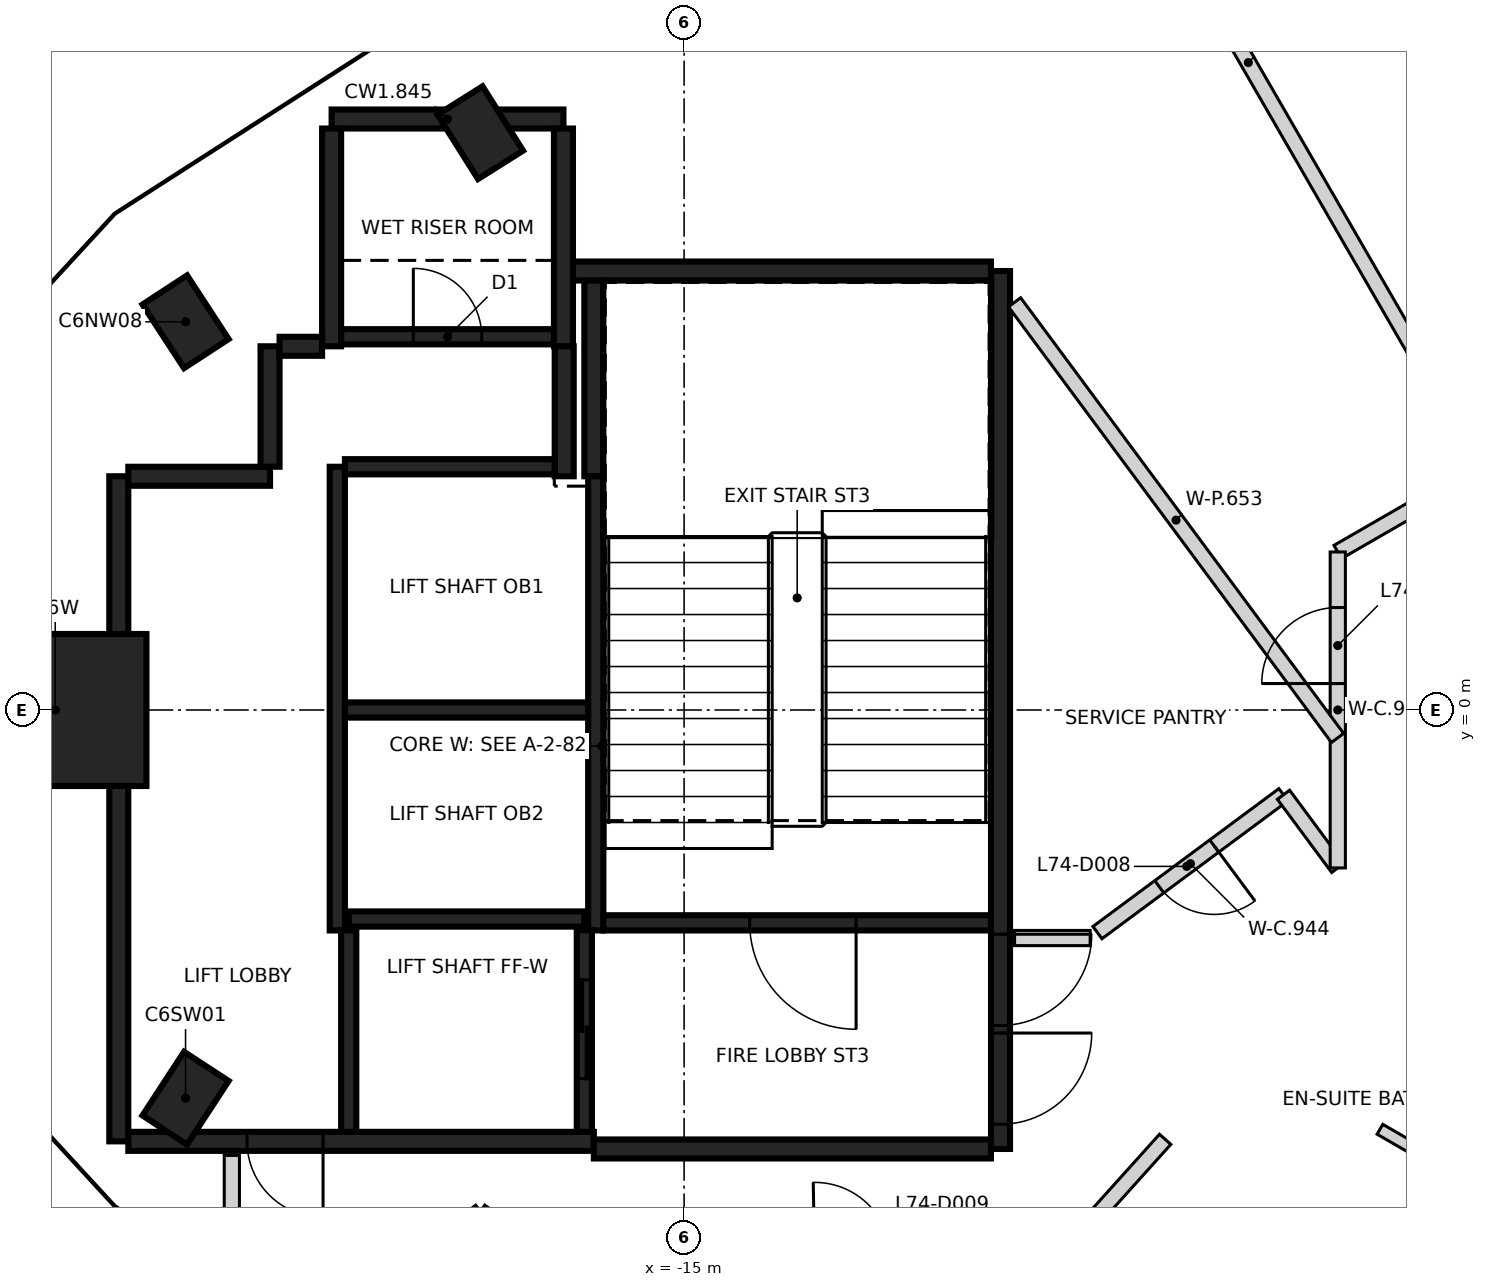
"""IFC4 building model, lengths in metres.
Left out: names, types, materials, properties, quantities, classifications, styles, units other than length and angle.
Written with IfcOpenShell. Run it as: python <this file> out.ifc"""

import sys

from ifc_helpers import new_model, si_unit, direction, frame, frame_2d, origin, origin_2d, place, context, subcontext, project, spatial, rectangle, extrude, element, fill, save


model = new_model("IFC4")
c1 = context("Model", 3, precision=1e-05, world=origin(), true_north=direction((0.0, 1.0)))
c2 = subcontext(c1, "Body", "Model", "MODEL_VIEW")
j1 = project(units=[si_unit("LENGTHUNIT", "METRE"), si_unit("PLANEANGLEUNIT", "RADIAN")], contexts=[c1])
p1 = place(None, origin())
s1 = spatial("IfcSite", under=j1, at=p1, CompositionType="ELEMENT")
p2 = place(p1, origin())
s2 = spatial("IfcBuilding", under=s1, at=p2, CompositionType="ELEMENT")
p3 = place(p2, frame((0.0, 0.0, 294.6)))
s3 = spatial("IfcBuildingStorey", under=s2, at=p3, CompositionType="ELEMENT", Elevation=294.6)
for number, where, z_axis, x_axis in (
    (1, (-17.681, 7.595, -0.35), (0.0, 0.0, 1.0), (-0.533, 0.846, 0.0)),
    (2, (-21.559, 5.107, -0.35), (0.0, 0.0, 1.0), (-0.547, 0.837, 0.0)),
    (3, (-21.559, -5.107, -0.35), (0.0, 0.0, 1.0), (0.547, 0.837, 0.0)),
):
    element("IfcColumn", number, at=place(p3, frame(where, z_axis=z_axis, x_axis=x_axis)), inside=s3, PredefinedType="COLUMN", context=c2, shape_type="SweptSolid", body=[
        extrude(rectangle(XDim=1.0, YDim=0.7, at=origin_2d()), origin(), (0.0, 0.0, 1.0), 3.6),
    ])
p4 = place(p3, frame((-23.273, 0.0, -0.35), z_axis=(0.0, 0.0, 1.0), x_axis=(1.0, 0.0, 0.0)))
e4 = element("IfcColumn", 4, at=p4, inside=s3, PredefinedType="COLUMN", context=c2, shape_type="SweptSolid", body=[
    extrude(rectangle(XDim=2.4, YDim=2.0, at=origin_2d()), origin(), (0.0, 0.0, 1.0), 3.6),
])
p5 = place(p3, frame((-10.837, 5.775, 0.0), z_axis=(0.0, 0.0, 1.0), x_axis=(0.0, -1.0, 0.0)))
e5 = element("IfcWall", 5, at=p5, inside=s3, PredefinedType="SHEAR", context=c2, shape_type="SweptSolid", body=[
    extrude(rectangle(XDim=11.55, YDim=0.25, at=frame_2d((5.775, 0.0))), origin(), (0.0, 0.0, 1.0), 3.25),
])
p6 = place(p5, frame((10.025, 0.0, 0.0)))
e6 = element("IfcOpeningElement", 6, at=p6, cuts=e5, PredefinedType="OPENING", context=c2, shape_type="SweptSolid", body=[
    extrude(rectangle(XDim=1.2, YDim=2.1, at=frame_2d((0.6, 1.05))), frame((0.0, 0.135, 0.0), z_axis=(0.0, -1.0, 0.0), x_axis=(1.0, 0.0, 0.0)), (0.0, 0.0, 1.0), 0.27),
])
p7 = place(p5, frame((8.725, 0.0, 0.0)))
e7 = element("IfcOpeningElement", 7, at=p7, cuts=e5, PredefinedType="OPENING", context=c2, shape_type="SweptSolid", body=[
    extrude(rectangle(XDim=1.2, YDim=2.1, at=frame_2d((0.6, 1.05))), frame((0.0, 0.135, 0.0), z_axis=(0.0, -1.0, 0.0), x_axis=(1.0, 0.0, 0.0)), (0.0, 0.0, 1.0), 0.27),
])
p8 = place(p3, frame((-22.437, -5.675, 0.0), z_axis=(0.0, 0.0, 1.0), x_axis=(0.0, 1.0, 0.0)))
e8 = element("IfcWall", 8, at=p8, inside=s3, PredefinedType="SHEAR", context=c2, shape_type="SweptSolid", body=[
    extrude(rectangle(XDim=8.75, YDim=0.25, at=frame_2d((4.375, 0.0))), origin(), (0.0, 0.0, 1.0), 3.25),
])
p9 = place(p3, frame((-16.187, -5.675, 0.0), z_axis=(0.0, 0.0, 1.0), x_axis=(-1.0, 0.0, 0.0)))
e9 = element("IfcWall", 9, at=p9, inside=s3, PredefinedType="SHEAR", context=c2, shape_type="SweptSolid", body=[
    extrude(rectangle(XDim=6.125, YDim=0.25, at=frame_2d((3.062, 0.0))), origin(), (0.0, 0.0, 1.0), 3.25),
])
p10 = place(p9, frame((3.563, 0.0, 0.0)))
e10 = element("IfcOpeningElement", 10, at=p10, cuts=e9, PredefinedType="OPENING", context=c2, shape_type="SweptSolid", body=[
    extrude(rectangle(XDim=1.0, YDim=2.1, at=frame_2d((0.5, 1.05))), frame((0.0, 0.135, 0.0), z_axis=(0.0, -1.0, 0.0), x_axis=(1.0, 0.0, 0.0)), (0.0, 0.0, 1.0), 0.27),
])
p11 = place(p3, frame((-10.963, -5.775, 0.0), z_axis=(0.0, 0.0, 1.0), x_axis=(-1.0, 0.0, 0.0)))
e11 = element("IfcWall", 11, at=p11, inside=s3, PredefinedType="SHEAR", context=c2, shape_type="SweptSolid", body=[
    extrude(rectangle(XDim=5.225, YDim=0.25, at=frame_2d((2.612, 0.0))), origin(), (0.0, 0.0, 1.0), 3.25),
])
p12 = place(p3, frame((-16.472, 5.775, 0.0), z_axis=(0.0, 0.0, 1.0), x_axis=(1.0, 0.0, 0.0)))
e12 = element("IfcWall", 12, at=p12, inside=s3, PredefinedType="SHEAR", context=c2, shape_type="SweptSolid", body=[
    extrude(rectangle(XDim=5.51, YDim=0.25, at=frame_2d((2.755, 0.0))), origin(), (0.0, 0.0, 1.0), 3.25),
])
p13 = place(p3, frame((-19.637, 7.775, 0.0), z_axis=(0.0, 0.0, 1.0), x_axis=(1.0, 0.0, 0.0)))
e13 = element("IfcWall", 13, at=p13, inside=s3, PredefinedType="SHEAR", context=c2, shape_type="SweptSolid", body=[
    extrude(rectangle(XDim=3.05, YDim=0.25, at=frame_2d((1.525, 0.0))), origin(), (0.0, 0.0, 1.0), 3.25),
])
for number, where, z_axis, x_axis in (
    (14, (-16.587, 7.65, 0.0), (0.0, 0.0, 1.0), (0.0, -1.0, 0.0)),
    (15, (-19.637, 4.785, 0.0), (0.0, 0.0, 1.0), (0.0, 1.0, 0.0)),
):
    element("IfcWall", number, at=place(p3, frame(where, z_axis=z_axis, x_axis=x_axis)), inside=s3, PredefinedType="SHEAR", context=c2, shape_type="SweptSolid", body=[
        extrude(rectangle(XDim=2.865, YDim=0.25, at=frame_2d((1.432, 0.0))), origin(), (0.0, 0.0, 1.0), 3.25),
    ])
p14 = place(p3, frame((-16.187, 3.075, 0.0), z_axis=(0.0, 0.0, 1.0), x_axis=(0.0, 1.0, 0.0)))
e16 = element("IfcWall", 16, at=p14, inside=s3, PredefinedType="SHEAR", context=c2, shape_type="SweptSolid", body=[
    extrude(rectangle(XDim=2.575, YDim=0.25, at=frame_2d((1.287, 0.0))), origin(), (0.0, 0.0, 1.0), 3.25),
])
p15 = place(p3, frame((-22.312, 3.075, 0.0), z_axis=(0.0, 0.0, 1.0), x_axis=(1.0, 0.0, 0.0)))
e17 = element("IfcWall", 17, at=p15, inside=s3, PredefinedType="SHEAR", context=c2, shape_type="SweptSolid", body=[
    extrude(rectangle(XDim=1.865, YDim=0.25, at=frame_2d((0.932, 0.0))), origin(), (0.0, 0.0, 1.0), 3.25),
])
p16 = place(p3, frame((-16.577, 4.785, 0.0), z_axis=(0.0, 0.0, 1.0), x_axis=(0.0, -1.0, 0.0)))
e18 = element("IfcWall", 18, at=p16, inside=s3, PredefinedType="SHEAR", context=c2, shape_type="SweptSolid", body=[
    extrude(rectangle(XDim=1.71, YDim=0.25, at=frame_2d((0.855, 0.0))), origin(), (0.0, 0.0, 1.0), 3.25),
])
p17 = place(p3, frame((-20.447, 3.2, 0.0), z_axis=(0.0, 0.0, 1.0), x_axis=(0.0, 1.0, 0.0)))
e19 = element("IfcWall", 19, at=p17, inside=s3, PredefinedType="SHEAR", context=c2, shape_type="SweptSolid", body=[
    extrude(rectangle(XDim=1.584, YDim=0.25, at=frame_2d((0.792, 0.0))), origin(), (0.0, 0.0, 1.0), 3.25),
])
p18 = place(p3, frame((-20.322, 4.785, 0.0), z_axis=(0.0, 0.0, 1.0), x_axis=(1.0, 0.0, 0.0)))
e20 = element("IfcWall", 20, at=p18, inside=s3, PredefinedType="SHEAR", context=c2, shape_type="SweptSolid", body=[
    extrude(rectangle(XDim=0.559, YDim=0.25, at=frame_2d((0.28, 0.0))), origin(), (0.0, 0.0, 1.0), 3.25),
])
p19 = place(p3, frame((-16.162, 3.074, 0.0), z_axis=(0.0, 0.0, 1.0), x_axis=(0.0, -1.0, 0.0)))
e21 = element("IfcWall", 21, at=p19, inside=s3, PredefinedType="SHEAR", context=c2, shape_type="SweptSolid", body=[
    extrude(rectangle(XDim=5.974, YDim=0.2, at=frame_2d((2.987, 0.0))), origin(), (0.0, 0.0, 1.0), 3.25),
])
p20 = place(p3, frame((-19.562, -2.9, 0.0), z_axis=(0.0, 0.0, 1.0), x_axis=(0.0, 1.0, 0.0)))
e22 = element("IfcWall", 22, at=p20, inside=s3, PredefinedType="SHEAR", context=c2, shape_type="SweptSolid", body=[
    extrude(rectangle(XDim=6.1, YDim=0.2, at=frame_2d((3.05, 0.0))), origin(), (0.0, 0.0, 1.0), 3.25),
])
p21 = place(p3, frame((-10.963, -2.8, 0.0), z_axis=(0.0, 0.0, 1.0), x_axis=(-1.0, 0.0, 0.0)))
e23 = element("IfcWall", 23, at=p21, inside=s3, PredefinedType="SHEAR", context=c2, shape_type="SweptSolid", body=[
    extrude(rectangle(XDim=5.098, YDim=0.2, at=frame_2d((2.549, 0.0))), origin(), (0.0, 0.0, 1.0), 3.25),
])
p22 = place(p21, frame((1.774, 0.0, 0.0)))
e24 = element("IfcOpeningElement", 24, at=p22, cuts=e23, PredefinedType="OPENING", context=c2, shape_type="SweptSolid", body=[
    extrude(rectangle(XDim=1.4, YDim=2.1, at=frame_2d((0.7, 1.05))), frame((0.0, 0.11, 0.0), z_axis=(0.0, -1.0, 0.0), x_axis=(1.0, 0.0, 0.0)), (0.0, 0.0, 1.0), 0.22),
])
p23 = place(p3, frame((-16.263, 0.0, 0.0), z_axis=(0.0, 0.0, 1.0), x_axis=(-1.0, 0.0, 0.0)))
e25 = element("IfcWall", 25, at=p23, inside=s3, PredefinedType="SHEAR", context=c2, shape_type="SweptSolid", body=[
    extrude(rectangle(XDim=3.198, YDim=0.2, at=frame_2d((1.599, 0.0))), origin(), (0.0, 0.0, 1.0), 3.25),
])
p24 = place(p3, frame((-19.511, 4.91, 0.0), z_axis=(0.0, 0.0, 1.0), x_axis=(1.0, 0.0, 0.0)))
e26 = element("IfcWall", 26, at=p24, inside=s3, PredefinedType="SHEAR", context=c2, shape_type="SweptSolid", body=[
    extrude(rectangle(XDim=2.798, YDim=0.2, at=frame_2d((1.399, 0.0))), origin(), (0.0, 0.0, 1.0), 3.25),
])
p25 = place(p24, frame((0.949, 0.0, 0.0)))
e27 = element("IfcOpeningElement", 27, at=p25, cuts=e26, PredefinedType="OPENING", context=c2, shape_type="SweptSolid", body=[
    extrude(rectangle(XDim=0.9, YDim=2.1, at=frame_2d((0.45, 1.05))), frame((0.0, 0.11, 0.0), z_axis=(0.0, -1.0, 0.0), x_axis=(1.0, 0.0, 0.0)), (0.0, 0.0, 1.0), 0.22),
])
p26 = place(p3, frame((-19.462, 3.2, 0.0), z_axis=(0.0, 0.0, 1.0), x_axis=(1.0, 0.0, 0.0)))
e28 = element("IfcWall", 28, at=p26, inside=s3, PredefinedType="SHEAR", context=c2, shape_type="SweptSolid", body=[
    extrude(rectangle(XDim=2.759, YDim=0.2, at=frame_2d((1.379, 0.0))), origin(), (0.0, 0.0, 1.0), 3.25),
])
p27 = place(p3, frame((-19.412, -2.75, 0.0), z_axis=(0.0, 0.0, 1.0), x_axis=(1.0, 0.0, 0.0)))
e29 = element("IfcWall", 29, at=p27, inside=s3, PredefinedType="SHEAR", context=c2, shape_type="SweptSolid", body=[
    extrude(rectangle(XDim=3.1, YDim=0.2, at=frame_2d((1.55, 0.0))), origin(), (0.0, 0.0, 1.0), 3.25),
])
p28 = place(p3, frame((-16.312, -2.898, 0.0), z_axis=(0.0, 0.0, 1.0), x_axis=(0.0, -1.0, 0.0)))
e30 = element("IfcWall", 30, at=p28, inside=s3, PredefinedType="SHEAR", context=c2, shape_type="SweptSolid", body=[
    extrude(rectangle(XDim=2.651, YDim=0.2, at=frame_2d((1.325, 0.0))), origin(), (0.0, 0.0, 1.0), 3.25),
])
p29 = place(p28, frame((0.652, 0.0, 0.0)))
e31 = element("IfcOpeningElement", 31, at=p29, cuts=e30, PredefinedType="OPENING", context=c2, shape_type="SweptSolid", body=[
    extrude(rectangle(XDim=1.3, YDim=2.1, at=frame_2d((0.65, 1.05))), frame((0.0, 0.11, 0.0), z_axis=(0.0, -1.0, 0.0), x_axis=(1.0, 0.0, 0.0)), (0.0, 0.0, 1.0), 0.22),
])
p30 = place(p3, frame((-19.412, -5.549, 0.0), z_axis=(0.0, 0.0, 1.0), x_axis=(0.0, 1.0, 0.0)))
e32 = element("IfcWall", 32, at=p30, inside=s3, PredefinedType="SHEAR", context=c2, shape_type="SweptSolid", body=[
    extrude(rectangle(XDim=2.651, YDim=0.2, at=frame_2d((1.325, 0.0))), origin(), (0.0, 0.0, 1.0), 3.25),
])
p31 = place(p3, frame((-20.95, -6.65, 0.0), z_axis=(0.0, 0.0, 1.0), x_axis=(0.0, 1.0, 0.0)))
e33 = element("IfcWall", 33, at=p31, inside=s3, PredefinedType="PARTITIONING", context=c2, shape_type="SweptSolid", body=[
    extrude(rectangle(XDim=0.79, YDim=0.2, at=frame_2d((0.395, 0.0))), origin(), (0.0, 0.0, 1.0), 3.25),
])
p32 = place(p3, frame((-18.642, -7.319, 0.0), z_axis=(0.0, 0.0, 1.0), x_axis=(0.798707882989, 0.601718968998, 0.0)))
e34 = element("IfcWall", 34, at=p32, inside=s3, PredefinedType="PARTITIONING", context=c2, shape_type="SweptSolid", body=[
    extrude(rectangle(XDim=1.203, YDim=0.2, at=frame_2d((0.602, 0.0))), origin(), (0.0, 0.0, 1.0), 2.35),
])
p33 = place(p3, frame((-17.681, -6.595, 0.0), z_axis=(0.0, 0.0, 1.0), x_axis=(0.810123213102, -0.586259652026, 0.0)))
e35 = element("IfcWall", 35, at=p33, inside=s3, PredefinedType="PARTITIONING", context=c2, shape_type="SweptSolid", body=[
    extrude(rectangle(XDim=1.17, YDim=0.2, at=frame_2d((0.585, 0.0))), origin(), (0.0, 0.0, 1.0), 3.25),
])
p34 = place(p3, frame((-10.652, -3.0, 0.0), z_axis=(0.0, 0.0, 1.0), x_axis=(1.0, 0.0, 0.0)))
e36 = element("IfcWall", 36, at=p34, inside=s3, PredefinedType="PARTITIONING", context=c2, shape_type="SweptSolid", body=[
    extrude(rectangle(XDim=0.994, YDim=0.2, at=frame_2d((0.497, 0.0))), origin(), (0.0, 0.0, 1.0), 3.25),
])
p35 = place(p3, frame((-10.023, -7.151, 0.0), z_axis=(0.0, 0.0, 1.0), x_axis=(0.668804583793, 0.743438248073, 0.0)))
e37 = element("IfcWall", 37, at=p35, inside=s3, PredefinedType="PARTITIONING", context=c2, shape_type="SweptSolid", body=[
    extrude(rectangle(XDim=2.021, YDim=0.2, at=frame_2d((1.011, 0.0))), origin(), (0.0, 0.0, 1.0), 3.25),
])
p36 = place(p3, frame((-7.115, -1.115, 0.0), z_axis=(0.0, 0.0, 1.0), x_axis=(-0.803344165632, -0.595515030495, 0.0)))
e38 = element("IfcWall", 38, at=p36, inside=s3, PredefinedType="PARTITIONING", context=c2, shape_type="SweptSolid", body=[
    extrude(rectangle(XDim=3.046, YDim=0.2, at=frame_2d((1.523, 0.0))), origin(), (0.0, 0.0, 1.0), 3.25),
])
p37 = place(p36, frame((1.133, 0.0, 0.0)))
e39 = element("IfcOpeningElement", 39, at=p37, cuts=e38, PredefinedType="OPENING", context=c2, shape_type="SweptSolid", body=[
    extrude(rectangle(XDim=0.9, YDim=2.1, at=frame_2d((0.45, 1.05))), frame((0.0, 0.11, 0.0), z_axis=(0.0, -1.0, 0.0), x_axis=(1.0, 0.0, 0.0)), (0.0, 0.0, 1.0), 0.22),
])
p38 = place(p3, frame((-7.114, -1.115, 0.0), z_axis=(0.0, 0.0, 1.0), x_axis=(0.595690139668, -0.803214328496, 0.0)))
e40 = element("IfcWall", 40, at=p38, inside=s3, PredefinedType="PARTITIONING", context=c2, shape_type="SweptSolid", body=[
    extrude(rectangle(XDim=1.199, YDim=0.2, at=frame_2d((0.599, 0.0))), origin(), (0.0, 0.0, 1.0), 3.25),
])
p39 = place(p3, frame((-6.4, 2.079, 0.0), z_axis=(0.0, 0.0, 1.0), x_axis=(0.866037708501, 0.499978687001, 0.0)))
e41 = element("IfcWall", 41, at=p39, inside=s3, PredefinedType="PARTITIONING", context=c2, shape_type="SweptSolid", body=[
    extrude(rectangle(XDim=6.818, YDim=0.2, at=frame_2d((3.409, 0.0))), origin(), (0.0, 0.0, 1.0), 3.25),
])
p40 = place(p39, frame((4.003, 0.0, 0.0)))
e42 = element("IfcOpeningElement", 42, at=p40, cuts=e41, PredefinedType="OPENING", context=c2, shape_type="SweptSolid", body=[
    extrude(rectangle(XDim=1.0, YDim=2.1, at=frame_2d((0.5, 1.05))), frame((0.0, 0.11, 0.0), z_axis=(0.0, -1.0, 0.0), x_axis=(1.0, 0.0, 0.0)), (0.0, 0.0, 1.0), 0.22),
])
p41 = place(p3, frame((-6.4, -2.078, 0.0), z_axis=(0.0, 0.0, 1.0), x_axis=(0.0, 1.0, 0.0)))
e43 = element("IfcWall", 43, at=p41, inside=s3, PredefinedType="PARTITIONING", context=c2, shape_type="SweptSolid", body=[
    extrude(rectangle(XDim=4.157, YDim=0.2, at=frame_2d((2.079, 0.0))), origin(), (0.0, 0.0, 1.0), 3.25),
])
p42 = place(p41, frame((2.426, 0.0, 0.0)))
e44 = element("IfcOpeningElement", 44, at=p42, cuts=e43, PredefinedType="OPENING", context=c2, shape_type="SweptSolid", body=[
    extrude(rectangle(XDim=1.0, YDim=2.1, at=frame_2d((0.5, 1.05))), frame((0.0, 0.11, 0.0), z_axis=(0.0, -1.0, 0.0), x_axis=(1.0, 0.0, 0.0)), (0.0, 0.0, 1.0), 0.22),
])
p43 = place(p3, frame((-10.652, 5.364, 0.0), z_axis=(0.0, 0.0, 1.0), x_axis=(0.595550732464, -0.803317698711, 0.0)))
e45 = element("IfcWall", 45, at=p43, inside=s3, PredefinedType="PARTITIONING", context=c2, shape_type="SweptSolid", body=[
    extrude(rectangle(XDim=7.135, YDim=0.2, at=frame_2d((3.567, 0.0))), origin(), (0.0, 0.0, 1.0), 3.25),
])
p44 = place(p3, frame((-10.659, 13.856, 0.0), z_axis=(0.0, 0.0, 1.0), x_axis=(0.500004723409, -0.866022676706, 0.0)))
e46 = element("IfcWall", 46, at=p44, inside=s3, PredefinedType="PARTITIONING", context=c2, shape_type="SweptSolid", body=[
    extrude(rectangle(XDim=12.329, YDim=0.2, at=frame_2d((6.164, 0.0))), origin(), (0.0, 0.0, 1.0), 3.25),
])
p45 = place(p3, frame((-6.67, -16.159, 0.0), z_axis=(0.0, 0.0, 1.0), x_axis=(0.500017276951, 0.866015428702, 0.0)))
e47 = element("IfcWall", 47, at=p45, inside=s3, PredefinedType="PARTITIONING", context=c2, shape_type="SweptSolid", body=[
    extrude(rectangle(XDim=12.329, YDim=0.2, at=frame_2d((6.165, 0.0))), origin(), (0.0, 0.0, 1.0), 3.25),
])
p46 = place(p3, frame((-5.845, -5.516, 0.0), z_axis=(0.0, 0.0, 1.0), x_axis=(0.865972526687, -0.500091574638, 0.0)))
e48 = element("IfcWall", 48, at=p46, inside=s3, PredefinedType="PARTITIONING", context=c2, shape_type="SweptSolid", body=[
    extrude(rectangle(XDim=2.099, YDim=0.15, at=frame_2d((1.05, 0.0))), origin(), (0.0, 0.0, 1.0), 3.25),
])
p47 = place(p29, origin())
e49 = element("IfcDoor", 49, at=p47, inside=s3, OperationType="SLIDING_TO_RIGHT", PredefinedType="DOOR", context=c2, shape_type="SweptSolid", body=[
    extrude(rectangle(XDim=1.3, YDim=2.1, at=frame_2d((0.65, 1.05))), frame((0.0, 0.025, 0.0), z_axis=(0.0, -1.0, 0.0), x_axis=(1.0, 0.0, 0.0)), (0.0, 0.0, 1.0), 0.05),
])
fill(e31, e49)
p48 = place(p10, origin())
e50 = element("IfcDoor", 50, at=p48, inside=s3, OperationType="SINGLE_SWING_LEFT", PredefinedType="DOOR", context=c2, shape_type="SweptSolid", body=[
    extrude(rectangle(XDim=1.0, YDim=2.1, at=frame_2d((0.5, 1.05))), frame((0.0, 0.025, 0.0), z_axis=(0.0, -1.0, 0.0), x_axis=(1.0, 0.0, 0.0)), (0.0, 0.0, 1.0), 0.05),
])
fill(e10, e50)
p49 = place(p6, origin())
e51 = element("IfcDoor", 51, at=p49, inside=s3, OperationType="SINGLE_SWING_LEFT", PredefinedType="DOOR", context=c2, shape_type="SweptSolid", body=[
    extrude(rectangle(XDim=1.2, YDim=2.1, at=frame_2d((0.6, 1.05))), frame((0.0, 0.025, 0.0), z_axis=(0.0, -1.0, 0.0), x_axis=(1.0, 0.0, 0.0)), (0.0, 0.0, 1.0), 0.05),
])
fill(e6, e51)
p50 = place(p7, origin())
e52 = element("IfcDoor", 52, at=p50, inside=s3, OperationType="SINGLE_SWING_RIGHT", PredefinedType="DOOR", context=c2, shape_type="SweptSolid", body=[
    extrude(rectangle(XDim=1.2, YDim=2.1, at=frame_2d((0.6, 1.05))), frame((0.0, 0.025, 0.0), z_axis=(0.0, -1.0, 0.0), x_axis=(1.0, 0.0, 0.0)), (0.0, 0.0, 1.0), 0.05),
])
fill(e7, e52)
p51 = place(p22, origin())
e53 = element("IfcDoor", 53, at=p51, inside=s3, OperationType="SINGLE_SWING_RIGHT", PredefinedType="DOOR", context=c2, shape_type="SweptSolid", body=[
    extrude(rectangle(XDim=1.4, YDim=2.1, at=frame_2d((0.7, 1.05))), frame((0.0, 0.025, 0.0), z_axis=(0.0, -1.0, 0.0), x_axis=(1.0, 0.0, 0.0)), (0.0, 0.0, 1.0), 0.05),
])
fill(e24, e53)
p52 = place(p25, origin())
e54 = element("IfcDoor", 54, at=p52, inside=s3, OperationType="SINGLE_SWING_LEFT", PredefinedType="DOOR", context=c2, shape_type="SweptSolid", body=[
    extrude(rectangle(XDim=0.9, YDim=2.1, at=frame_2d((0.45, 1.05))), frame((0.0, 0.025, 0.0), z_axis=(0.0, -1.0, 0.0), x_axis=(1.0, 0.0, 0.0)), (0.0, 0.0, 1.0), 0.05),
])
fill(e27, e54)
p53 = place(p42, origin())
e55 = element("IfcDoor", 55, at=p53, inside=s3, OperationType="SINGLE_SWING_LEFT", PredefinedType="DOOR", context=c2, shape_type="SweptSolid", body=[
    extrude(rectangle(XDim=1.0, YDim=2.1, at=frame_2d((0.5, 1.05))), frame((0.0, 0.025, 0.0), z_axis=(0.0, -1.0, 0.0), x_axis=(1.0, 0.0, 0.0)), (0.0, 0.0, 1.0), 0.05),
])
fill(e44, e55)
p54 = place(p37, origin())
e56 = element("IfcDoor", 56, at=p54, inside=s3, OperationType="SINGLE_SWING_LEFT", PredefinedType="DOOR", context=c2, shape_type="SweptSolid", body=[
    extrude(rectangle(XDim=0.9, YDim=2.1, at=frame_2d((0.45, 1.05))), frame((0.0, 0.025, 0.0), z_axis=(0.0, -1.0, 0.0), x_axis=(1.0, 0.0, 0.0)), (0.0, 0.0, 1.0), 0.05),
])
fill(e39, e56)
save(model, sys.argv[1])
